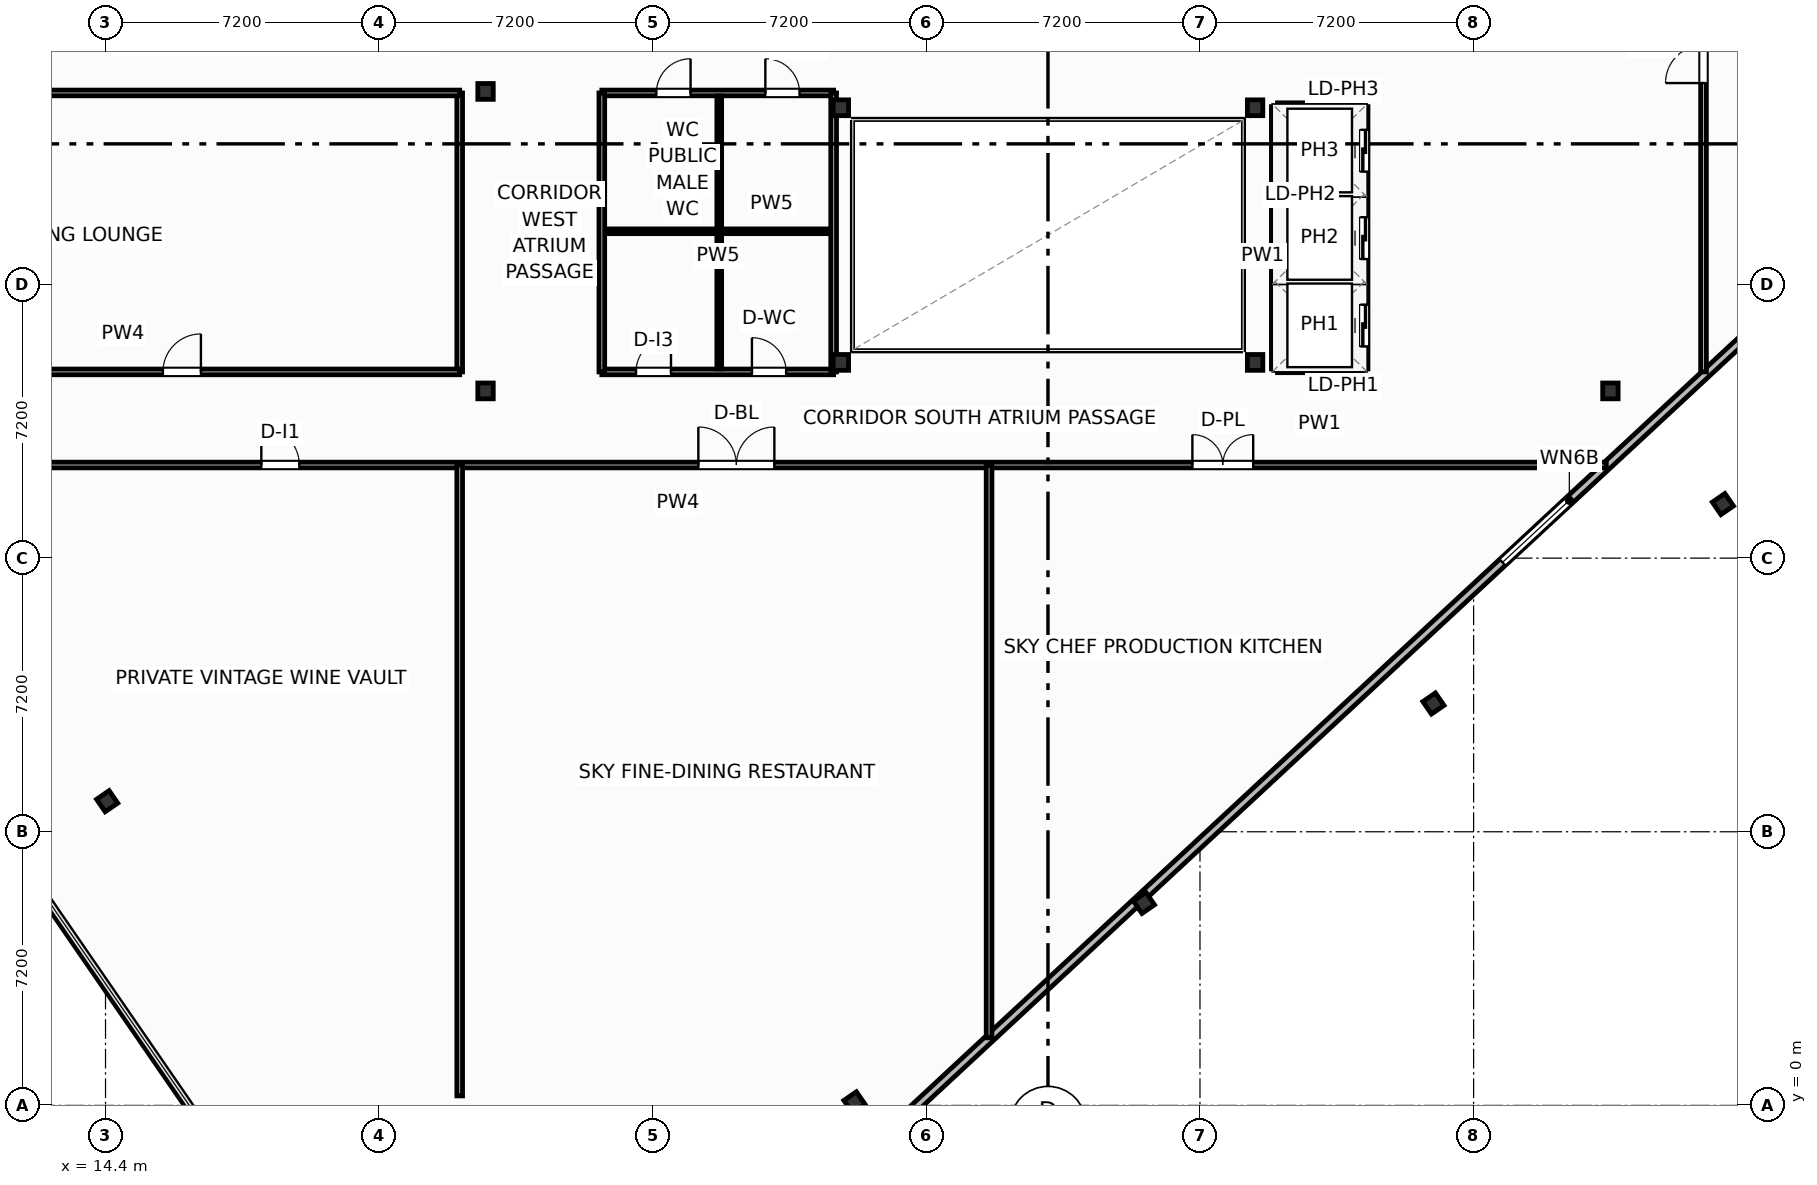
"""IFC4 building model, lengths in metres.
Left out: names, types, materials, properties, quantities, classifications, styles, units other than length and angle.
Written with IfcOpenShell. Run it as: python <this file> out.ifc"""

import sys

from ifc_helpers import new_model, si_unit, direction, frame, frame_2d, origin, origin_2d, place, context, subcontext, project, spatial, rectangle, i_section, extrude, element, fill, save


model = new_model("IFC4")
c1 = context("Model", 3, precision=1e-05, world=origin(), true_north=direction((0.0, 1.0)))
c2 = subcontext(c1, "Body", "Model", "MODEL_VIEW")
j1 = project(units=[si_unit("LENGTHUNIT", "METRE"), si_unit("PLANEANGLEUNIT", "RADIAN")], contexts=[c1])
p1 = place(None, origin())
s1 = spatial("IfcSite", under=j1, at=p1, CompositionType="ELEMENT")
p2 = place(p1, origin())
s2 = spatial("IfcBuilding", under=s1, at=p2, CompositionType="ELEMENT")
p3 = place(p2, frame((0.0, 0.0, 291.5)))
s3 = spatial("IfcBuildingStorey", under=s2, at=p3, CompositionType="ELEMENT", Elevation=291.5)
for number, where, z_axis, x_axis in (
    (1, (33.75, 19.55, 0.0), (0.0, 0.0, 1.0), (1.0, 0.0, 0.0)),
    (2, (44.65, 19.55, 0.0), (0.0, 0.0, 1.0), (1.0, 0.0, 0.0)),
    (3, (33.75, 26.25, 0.0), (0.0, 0.0, 1.0), (1.0, 0.0, 0.0)),
    (4, (44.65, 26.25, 0.0), (0.0, 0.0, 1.0), (1.0, 0.0, 0.0)),
    (5, (24.4, 18.8, 0.0), (0.0, 0.0, 1.0), (1.0, 0.0, 0.0)),
    (6, (24.4, 26.68, 0.0), (0.0, 0.0, 1.0), (1.0, 0.0, 0.0)),
    (7, (54.0, 18.8, 0.0), (0.0, 0.0, 1.0), (1.0, 0.0, 0.0)),
):
    element("IfcColumn", number, at=place(p3, frame(where, z_axis=z_axis, x_axis=x_axis)), inside=s3, PredefinedType="COLUMN", context=c2, shape_type="SweptSolid", body=[
        extrude(i_section(OverallWidth=0.406, OverallDepth=0.416, WebThickness=0.03, FlangeThickness=0.048, FilletRadius=0.025, at=origin_2d()), origin(), (0.0, 0.0, 1.0), 4.8),
    ])
for number, where, z_axis, x_axis in (
    (8, (34.107, 0.081, 0.0), (0.0, 0.0, 1.0), (0.824, 0.567, 0.0)),
    (9, (41.725, 5.328, 0.0), (0.0, 0.0, 1.0), (0.824, 0.567, 0.0)),
    (10, (49.343, 10.575, 0.0), (0.0, 0.0, 1.0), (0.824, 0.567, 0.0)),
    (11, (56.96, 15.823, 0.0), (0.0, 0.0, 1.0), (0.824, 0.567, 0.0)),
    (12, (14.443, 8.004, 0.0), (0.0, 0.0, 1.0), (0.824, 0.567, 0.0)),
):
    element("IfcColumn", number, at=place(p3, frame(where, z_axis=z_axis, x_axis=x_axis)), inside=s3, PredefinedType="COLUMN", context=c2, shape_type="SweptSolid", body=[
        extrude(i_section(OverallWidth=0.401, OverallDepth=0.399, WebThickness=0.025, FlangeThickness=0.04, FilletRadius=0.022, at=origin_2d()), origin(), (0.0, 0.0, 1.0), 4.8),
    ])
p4 = place(p3, frame((27.693, -7.489, 0.0), z_axis=(0.0, 0.0, 1.0), x_axis=(0.733009701217, 0.680218184057, 0.0)))
e13 = element("IfcWall", 13, at=p4, inside=s3, PredefinedType="SOLIDWALL", context=c2, shape_type="SweptSolid", body=[
    extrude(rectangle(XDim=66.428, YDim=0.22, at=frame_2d((33.214, 0.0))), origin(), (0.0, 0.0, 1.0), 2.265),
])
p5 = place(p4, frame((32.014, 0.0, 0.8)))
e14 = element("IfcOpeningElement", 14, at=p5, cuts=e13, PredefinedType="OPENING", context=c2, shape_type="SweptSolid", body=[
    extrude(rectangle(XDim=2.4, YDim=1.385, at=frame_2d((1.2, 0.692))), frame((0.0, 0.12, 0.0), z_axis=(0.0, -1.0, 0.0), x_axis=(1.0, 0.0, 0.0)), (0.0, 0.0, 1.0), 0.24),
])
p6 = place(p3, frame((50.695, 58.086, 0.0), z_axis=(0.0, 0.0, 1.0), x_axis=(-0.823531024939, -0.567271232272, 0.0)))
e15 = element("IfcWall", 15, at=p6, inside=s3, PredefinedType="SOLIDWALL", context=c2, shape_type="SweptSolid", body=[
    extrude(rectangle(XDim=56.157, YDim=0.22, at=frame_2d((28.079, 0.0))), origin(), (0.0, 0.0, 1.0), 3.76),
])
p7 = place(p6, frame((26.879, 0.0, 0.8)))
e16 = element("IfcOpeningElement", 16, at=p7, cuts=e15, PredefinedType="OPENING", context=c2, shape_type="SweptSolid", body=[
    extrude(rectangle(XDim=2.4, YDim=1.85, at=frame_2d((1.2, 0.925))), frame((0.0, 0.12, 0.0), z_axis=(0.0, -1.0, 0.0), x_axis=(1.0, 0.0, 0.0)), (0.0, 0.0, 1.0), 0.24),
])
p8 = place(p3, frame((27.46, 26.64, 0.0), z_axis=(0.0, 0.0, 1.0), x_axis=(1.0, 0.0, 0.0)))
e17 = element("IfcWall", 17, at=p8, inside=s3, PredefinedType="PARTITIONING", context=c2, shape_type="SweptSolid", body=[
    extrude(rectangle(XDim=6.1, YDim=0.15, at=frame_2d((3.05, 0.0))), origin(), (0.0, 0.0, 1.0), 3.692),
])
p9 = place(p8, frame((4.303, 0.0, 0.0)))
e18 = element("IfcOpeningElement", 18, at=p9, cuts=e17, PredefinedType="OPENING", context=c2, shape_type="SweptSolid", body=[
    extrude(rectangle(XDim=0.9, YDim=2.05, at=frame_2d((0.45, 1.025))), frame((0.0, 0.085, 0.0), z_axis=(0.0, -1.0, 0.0), x_axis=(1.0, 0.0, 0.0)), (0.0, 0.0, 1.0), 0.17),
])
p10 = place(p8, frame((1.435, 0.0, 0.0)))
e19 = element("IfcOpeningElement", 19, at=p10, cuts=e17, PredefinedType="OPENING", context=c2, shape_type="SweptSolid", body=[
    extrude(rectangle(XDim=0.9, YDim=2.05, at=frame_2d((0.45, 1.025))), frame((0.0, 0.085, 0.0), z_axis=(0.0, -1.0, 0.0), x_axis=(1.0, 0.0, 0.0)), (0.0, 0.0, 1.0), 0.17),
])
p11 = place(p3, frame((27.46, 19.3, 0.0), z_axis=(0.0, 0.0, 1.0), x_axis=(1.0, 0.0, 0.0)))
e20 = element("IfcWall", 20, at=p11, inside=s3, PredefinedType="PARTITIONING", context=c2, shape_type="SweptSolid", body=[
    extrude(rectangle(XDim=6.1, YDim=0.15, at=frame_2d((3.05, 0.0))), origin(), (0.0, 0.0, 1.0), 3.692),
])
p12 = place(p11, frame((0.9, 0.0, 0.0)))
e21 = element("IfcOpeningElement", 21, at=p12, cuts=e20, PredefinedType="OPENING", context=c2, shape_type="SweptSolid", body=[
    extrude(rectangle(XDim=0.92, YDim=2.05, at=frame_2d((0.46, 1.025))), frame((0.0, 0.085, 0.0), z_axis=(0.0, -1.0, 0.0), x_axis=(1.0, 0.0, 0.0)), (0.0, 0.0, 1.0), 0.17),
])
p13 = place(p11, frame((3.95, 0.0, 0.0)))
e22 = element("IfcOpeningElement", 22, at=p13, cuts=e20, PredefinedType="OPENING", context=c2, shape_type="SweptSolid", body=[
    extrude(rectangle(XDim=0.9, YDim=2.05, at=frame_2d((0.45, 1.025))), frame((0.0, 0.085, 0.0), z_axis=(0.0, -1.0, 0.0), x_axis=(1.0, 0.0, 0.0)), (0.0, 0.0, 1.0), 0.17),
])
p14 = place(p3, frame((30.55, 19.38, 0.0), z_axis=(0.0, 0.0, 1.0), x_axis=(0.0, 1.0, 0.0)))
e23 = element("IfcWall", 23, at=p14, inside=s3, PredefinedType="PARTITIONING", context=c2, shape_type="SweptSolid", body=[
    extrude(rectangle(XDim=7.18, YDim=0.125, at=frame_2d((3.59, 0.0))), origin(), (0.0, 0.0, 1.0), 4.48),
])
p15 = place(p3, frame((27.52, 23.0, 0.0), z_axis=(0.0, 0.0, 1.0), x_axis=(1.0, 0.0, 0.0)))
e24 = element("IfcWall", 24, at=p15, inside=s3, PredefinedType="PARTITIONING", context=c2, shape_type="SweptSolid", body=[
    extrude(rectangle(XDim=6.0, YDim=0.125, at=frame_2d((3.0, 0.0))), origin(), (0.0, 0.0, 1.0), 4.48),
])
p16 = place(p3, frame((27.46, 19.3, 0.0), z_axis=(0.0, 0.0, 1.0), x_axis=(0.0, 1.0, 0.0)))
e25 = element("IfcWall", 25, at=p16, inside=s3, PredefinedType="PARTITIONING", context=c2, shape_type="SweptSolid", body=[
    extrude(rectangle(XDim=7.34, YDim=0.15, at=frame_2d((3.67, 0.0))), origin(), (0.0, 0.0, 1.0), 4.48),
])
p17 = place(p3, frame((33.56, 19.3, 0.0), z_axis=(0.0, 0.0, 1.0), x_axis=(0.0, 1.0, 0.0)))
e26 = element("IfcWall", 26, at=p17, inside=s3, PredefinedType="PARTITIONING", context=c2, shape_type="SweptSolid", body=[
    extrude(rectangle(XDim=7.34, YDim=0.15, at=frame_2d((3.67, 0.0))), origin(), (0.0, 0.0, 1.0), 2.265),
])
p18 = place(p3, frame((56.45, 19.3, 0.0), z_axis=(0.0, 0.0, 1.0), x_axis=(0.0, 1.0, 0.0)))
e27 = element("IfcWall", 27, at=p18, inside=s3, PredefinedType="PARTITIONING", context=c2, shape_type="SweptSolid", body=[
    extrude(rectangle(XDim=32.7, YDim=0.15, at=frame_2d((16.35, 0.0))), origin(), (0.0, 0.0, 1.0), 2.265),
])
p19 = place(p18, frame((7.6, 0.0, 0.0)))
e28 = element("IfcOpeningElement", 28, at=p19, cuts=e27, PredefinedType="OPENING", context=c2, shape_type="SweptSolid", body=[
    extrude(rectangle(XDim=2.0, YDim=2.05, at=frame_2d((1.0, 1.025))), frame((0.0, 0.085, 0.0), z_axis=(0.0, -1.0, 0.0), x_axis=(1.0, 0.0, 0.0)), (0.0, 0.0, 1.0), 0.17),
])
p20 = place(p3, frame((5.038, 16.85, 0.0), z_axis=(0.0, 0.0, 1.0), x_axis=(1.0, 0.0, 0.0)))
e29 = element("IfcWall", 29, at=p20, inside=s3, PredefinedType="PARTITIONING", context=c2, shape_type="SweptSolid", body=[
    extrude(rectangle(XDim=48.854, YDim=0.15, at=frame_2d((24.427, 0.0))), origin(), (0.0, 0.0, 1.0), 2.265),
])
p21 = place(p20, frame((13.462, 0.0, 0.0)))
e30 = element("IfcOpeningElement", 30, at=p21, cuts=e29, PredefinedType="OPENING", context=c2, shape_type="SweptSolid", body=[
    extrude(rectangle(XDim=1.0, YDim=2.05, at=frame_2d((0.5, 1.025))), frame((0.0, 0.085, 0.0), z_axis=(0.0, -1.0, 0.0), x_axis=(1.0, 0.0, 0.0)), (0.0, 0.0, 1.0), 0.17),
])
p22 = place(p20, frame((24.962, 0.0, 0.0)))
e31 = element("IfcOpeningElement", 31, at=p22, cuts=e29, PredefinedType="OPENING", context=c2, shape_type="SweptSolid", body=[
    extrude(rectangle(XDim=2.0, YDim=2.05, at=frame_2d((1.0, 1.025))), frame((0.0, 0.085, 0.0), z_axis=(0.0, -1.0, 0.0), x_axis=(1.0, 0.0, 0.0)), (0.0, 0.0, 1.0), 0.17),
])
p23 = place(p20, frame((37.962, 0.0, 0.0)))
e32 = element("IfcOpeningElement", 32, at=p23, cuts=e29, PredefinedType="OPENING", context=c2, shape_type="SweptSolid", body=[
    extrude(rectangle(XDim=1.6, YDim=2.05, at=frame_2d((0.8, 1.025))), frame((0.0, 0.085, 0.0), z_axis=(0.0, -1.0, 0.0), x_axis=(1.0, 0.0, 0.0)), (0.0, 0.0, 1.0), 0.17),
])
p24 = place(p3, frame((23.72, 0.25, 0.0), z_axis=(0.0, 0.0, 1.0), x_axis=(0.0, 1.0, 0.0)))
e33 = element("IfcWall", 33, at=p24, inside=s3, PredefinedType="PARTITIONING", context=c2, shape_type="SweptSolid", body=[
    extrude(rectangle(XDim=16.6, YDim=0.15, at=frame_2d((8.3, 0.0))), origin(), (0.0, 0.0, 1.0), 4.48),
])
p25 = place(p3, frame((23.72, 19.3, 0.0), z_axis=(0.0, 0.0, 1.0), x_axis=(0.0, 1.0, 0.0)))
e34 = element("IfcWall", 34, at=p25, inside=s3, PredefinedType="PARTITIONING", context=c2, shape_type="SweptSolid", body=[
    extrude(rectangle(XDim=7.34, YDim=0.15, at=frame_2d((3.67, 0.0))), origin(), (0.0, 0.0, 1.0), 4.48),
])
p26 = place(p3, frame((6.0, 19.3, 0.0), z_axis=(0.0, 0.0, 1.0), x_axis=(1.0, 0.0, 0.0)))
e35 = element("IfcWall", 35, at=p26, inside=s3, PredefinedType="PARTITIONING", context=c2, shape_type="SweptSolid", body=[
    extrude(rectangle(XDim=17.72, YDim=0.15, at=frame_2d((8.86, 0.0))), origin(), (0.0, 0.0, 1.0), 4.48),
])
p27 = place(p26, frame((9.91, 0.0, 0.0)))
e36 = element("IfcOpeningElement", 36, at=p27, cuts=e35, PredefinedType="OPENING", context=c2, shape_type="SweptSolid", body=[
    extrude(rectangle(XDim=1.0, YDim=2.05, at=frame_2d((0.5, 1.025))), frame((0.0, 0.085, 0.0), z_axis=(0.0, -1.0, 0.0), x_axis=(1.0, 0.0, 0.0)), (0.0, 0.0, 1.0), 0.17),
])
p28 = place(p3, frame((37.65, 1.778, 0.0), z_axis=(0.0, 0.0, 1.0), x_axis=(0.0, 1.0, 0.0)))
e37 = element("IfcWall", 37, at=p28, inside=s3, PredefinedType="PARTITIONING", context=c2, shape_type="SweptSolid", body=[
    extrude(rectangle(XDim=15.072, YDim=0.15, at=frame_2d((7.536, 0.0))), origin(), (0.0, 0.0, 1.0), 4.48),
])
p29 = place(p3, frame((5.078, 26.64, 0.0), z_axis=(0.0, 0.0, 1.0), x_axis=(1.0, 0.0, 0.0)))
e38 = element("IfcWall", 38, at=p29, inside=s3, PredefinedType="PARTITIONING", context=c2, shape_type="SweptSolid", body=[
    extrude(rectangle(XDim=18.642, YDim=0.15, at=frame_2d((9.321, 0.0))), origin(), (0.0, 0.0, 1.0), 2.265),
])
for number, where, z_axis, x_axis in (
    (39, (45.24, 21.675, 0.0), (0.0, 0.0, 1.0), (1.0, 0.0, 0.0)),
    (40, (45.24, 23.975, 0.0), (0.0, 0.0, 1.0), (1.0, 0.0, 0.0)),
):
    element("IfcWall", number, at=place(p3, frame(where, z_axis=z_axis, x_axis=x_axis)), inside=s3, PredefinedType="PARTITIONING", context=c2, shape_type="SweptSolid", body=[
        extrude(rectangle(XDim=2.22, YDim=0.2, at=frame_2d((1.11, 0.0))), origin(), (0.0, 0.0, 1.0), 4.48),
    ])
p30 = place(p3, frame((45.24, 19.38, 0.0), z_axis=(0.0, 0.0, 1.0), x_axis=(1.0, 0.0, 0.0)))
e41 = element("IfcWall", 41, at=p30, inside=s3, PredefinedType="PARTITIONING", context=c2, shape_type="SweptSolid", body=[
    extrude(rectangle(XDim=2.22, YDim=0.2, at=frame_2d((1.11, 0.0))), origin(), (0.0, 0.0, 1.0), 3.692),
])
p31 = place(p3, frame((45.24, 26.28, 0.0), z_axis=(0.0, 0.0, 1.0), x_axis=(1.0, 0.0, 0.0)))
e42 = element("IfcWall", 42, at=p31, inside=s3, PredefinedType="PARTITIONING", context=c2, shape_type="SweptSolid", body=[
    extrude(rectangle(XDim=2.22, YDim=0.2, at=frame_2d((1.11, 0.0))), origin(), (0.0, 0.0, 1.0), 4.48),
])
p32 = place(p3, frame((45.18, 19.38, 0.0), z_axis=(0.0, 0.0, 1.0), x_axis=(0.0, 1.0, 0.0)))
e43 = element("IfcWall", 43, at=p32, inside=s3, PredefinedType="PARTITIONING", context=c2, shape_type="SweptSolid", body=[
    extrude(rectangle(XDim=6.9, YDim=0.2, at=frame_2d((3.45, 0.0))), origin(), (0.0, 0.0, 1.0), 4.48),
])
p33 = place(p3, frame((47.52, 19.38, 0.0), z_axis=(0.0, 0.0, 1.0), x_axis=(0.0, 1.0, 0.0)))
e44 = element("IfcWall", 44, at=p33, inside=s3, PredefinedType="PARTITIONING", context=c2, shape_type="SweptSolid", body=[
    extrude(rectangle(XDim=6.9, YDim=0.2, at=frame_2d((3.45, 0.0))), origin(), (0.0, 0.0, 1.0), 4.48),
])
p34 = place(p33, frame((0.59, 0.0, 0.0)))
e45 = element("IfcOpeningElement", 45, at=p34, cuts=e44, PredefinedType="OPENING", context=c2, shape_type="SweptSolid", body=[
    extrude(rectangle(XDim=1.1, YDim=2.15, at=frame_2d((0.55, 1.075))), frame((0.0, 0.11, 0.0), z_axis=(0.0, -1.0, 0.0), x_axis=(1.0, 0.0, 0.0)), (0.0, 0.0, 1.0), 0.22),
])
p35 = place(p33, frame((2.89, 0.0, 0.0)))
e46 = element("IfcOpeningElement", 46, at=p35, cuts=e44, PredefinedType="OPENING", context=c2, shape_type="SweptSolid", body=[
    extrude(rectangle(XDim=1.1, YDim=2.15, at=frame_2d((0.55, 1.075))), frame((0.0, 0.11, 0.0), z_axis=(0.0, -1.0, 0.0), x_axis=(1.0, 0.0, 0.0)), (0.0, 0.0, 1.0), 0.22),
])
p36 = place(p33, frame((5.19, 0.0, 0.0)))
e47 = element("IfcOpeningElement", 47, at=p36, cuts=e44, PredefinedType="OPENING", context=c2, shape_type="SweptSolid", body=[
    extrude(rectangle(XDim=1.1, YDim=2.15, at=frame_2d((0.55, 1.075))), frame((0.0, 0.11, 0.0), z_axis=(0.0, -1.0, 0.0), x_axis=(1.0, 0.0, 0.0)), (0.0, 0.0, 1.0), 0.22),
])
p37 = place(p5, origin())
e48 = element("IfcWindow", 48, at=p37, inside=s3, PartitioningType="SINGLE_PANEL", PredefinedType="WINDOW", context=c2, shape_type="SweptSolid", body=[
    extrude(rectangle(XDim=2.4, YDim=1.385, at=frame_2d((1.2, 0.692))), frame((0.0, 0.03, 0.0), z_axis=(0.0, -1.0, 0.0), x_axis=(1.0, 0.0, 0.0)), (0.0, 0.0, 1.0), 0.06),
])
fill(e14, e48)
p38 = place(p9, origin())
e49 = element("IfcDoor", 49, at=p38, inside=s3, OperationType="SINGLE_SWING_LEFT", PredefinedType="DOOR", context=c2, shape_type="SweptSolid", body=[
    extrude(rectangle(XDim=0.9, YDim=2.05, at=frame_2d((0.45, 1.025))), frame((0.0, 0.025, 0.0), z_axis=(0.0, -1.0, 0.0), x_axis=(1.0, 0.0, 0.0)), (0.0, 0.0, 1.0), 0.05),
])
fill(e18, e49)
p39 = place(p10, origin())
e50 = element("IfcDoor", 50, at=p39, inside=s3, OperationType="SINGLE_SWING_RIGHT", PredefinedType="DOOR", context=c2, shape_type="SweptSolid", body=[
    extrude(rectangle(XDim=0.9, YDim=2.05, at=frame_2d((0.45, 1.025))), frame((0.0, 0.025, 0.0), z_axis=(0.0, -1.0, 0.0), x_axis=(1.0, 0.0, 0.0)), (0.0, 0.0, 1.0), 0.05),
])
fill(e19, e50)
p40 = place(p12, origin())
e51 = element("IfcDoor", 51, at=p40, inside=s3, OperationType="SINGLE_SWING_RIGHT", PredefinedType="DOOR", context=c2, shape_type="SweptSolid", body=[
    extrude(rectangle(XDim=0.92, YDim=2.05, at=frame_2d((0.46, 1.025))), frame((0.0, 0.025, 0.0), z_axis=(0.0, -1.0, 0.0), x_axis=(1.0, 0.0, 0.0)), (0.0, 0.0, 1.0), 0.05),
])
fill(e21, e51)
p41 = place(p13, origin())
e52 = element("IfcDoor", 52, at=p41, inside=s3, OperationType="SINGLE_SWING_LEFT", PredefinedType="DOOR", context=c2, shape_type="SweptSolid", body=[
    extrude(rectangle(XDim=0.9, YDim=2.05, at=frame_2d((0.45, 1.025))), frame((0.0, 0.025, 0.0), z_axis=(0.0, -1.0, 0.0), x_axis=(1.0, 0.0, 0.0)), (0.0, 0.0, 1.0), 0.05),
])
fill(e22, e52)
p42 = place(p19, origin())
e53 = element("IfcDoor", 53, at=p42, inside=s3, OperationType="DOUBLE_DOOR_SINGLE_SWING", PredefinedType="DOOR", context=c2, shape_type="SweptSolid", body=[
    extrude(rectangle(XDim=2.0, YDim=2.05, at=frame_2d((1.0, 1.025))), frame((0.0, 0.025, 0.0), z_axis=(0.0, -1.0, 0.0), x_axis=(1.0, 0.0, 0.0)), (0.0, 0.0, 1.0), 0.05),
])
fill(e28, e53)
p43 = place(p21, origin())
e54 = element("IfcDoor", 54, at=p43, inside=s3, OperationType="SINGLE_SWING_LEFT", PredefinedType="DOOR", context=c2, shape_type="SweptSolid", body=[
    extrude(rectangle(XDim=1.0, YDim=2.05, at=frame_2d((0.5, 1.025))), frame((0.0, 0.025, 0.0), z_axis=(0.0, -1.0, 0.0), x_axis=(1.0, 0.0, 0.0)), (0.0, 0.0, 1.0), 0.05),
])
fill(e30, e54)
p44 = place(p22, origin())
e55 = element("IfcDoor", 55, at=p44, inside=s3, OperationType="DOUBLE_DOOR_SINGLE_SWING", PredefinedType="DOOR", context=c2, shape_type="SweptSolid", body=[
    extrude(rectangle(XDim=2.0, YDim=2.05, at=frame_2d((1.0, 1.025))), frame((0.0, 0.025, 0.0), z_axis=(0.0, -1.0, 0.0), x_axis=(1.0, 0.0, 0.0)), (0.0, 0.0, 1.0), 0.05),
])
fill(e31, e55)
p45 = place(p23, origin())
e56 = element("IfcDoor", 56, at=p45, inside=s3, OperationType="DOUBLE_DOOR_SINGLE_SWING", PredefinedType="DOOR", context=c2, shape_type="SweptSolid", body=[
    extrude(rectangle(XDim=1.6, YDim=2.05, at=frame_2d((0.8, 1.025))), frame((0.0, 0.025, 0.0), z_axis=(0.0, -1.0, 0.0), x_axis=(1.0, 0.0, 0.0)), (0.0, 0.0, 1.0), 0.05),
])
fill(e32, e56)
p46 = place(p27, origin())
e57 = element("IfcDoor", 57, at=p46, inside=s3, OperationType="SINGLE_SWING_RIGHT", PredefinedType="DOOR", context=c2, shape_type="SweptSolid", body=[
    extrude(rectangle(XDim=1.0, YDim=2.05, at=frame_2d((0.5, 1.025))), frame((0.0, 0.025, 0.0), z_axis=(0.0, -1.0, 0.0), x_axis=(1.0, 0.0, 0.0)), (0.0, 0.0, 1.0), 0.05),
])
fill(e36, e57)
p47 = place(p34, origin())
e58 = element("IfcDoor", 58, at=p47, inside=s3, OperationType="SLIDING_TO_LEFT", PredefinedType="DOOR", context=c2, shape_type="SweptSolid", body=[
    extrude(rectangle(XDim=1.1, YDim=2.15, at=frame_2d((0.55, 1.075))), frame((0.0, 0.025, 0.0), z_axis=(0.0, -1.0, 0.0), x_axis=(1.0, 0.0, 0.0)), (0.0, 0.0, 1.0), 0.05),
])
fill(e45, e58)
p48 = place(p35, origin())
e59 = element("IfcDoor", 59, at=p48, inside=s3, OperationType="SLIDING_TO_LEFT", PredefinedType="DOOR", context=c2, shape_type="SweptSolid", body=[
    extrude(rectangle(XDim=1.1, YDim=2.15, at=frame_2d((0.55, 1.075))), frame((0.0, 0.025, 0.0), z_axis=(0.0, -1.0, 0.0), x_axis=(1.0, 0.0, 0.0)), (0.0, 0.0, 1.0), 0.05),
])
fill(e46, e59)
p49 = place(p36, origin())
e60 = element("IfcDoor", 60, at=p49, inside=s3, OperationType="SLIDING_TO_LEFT", PredefinedType="DOOR", context=c2, shape_type="SweptSolid", body=[
    extrude(rectangle(XDim=1.1, YDim=2.15, at=frame_2d((0.55, 1.075))), frame((0.0, 0.025, 0.0), z_axis=(0.0, -1.0, 0.0), x_axis=(1.0, 0.0, 0.0)), (0.0, 0.0, 1.0), 0.05),
])
fill(e47, e60)
save(model, sys.argv[1])
